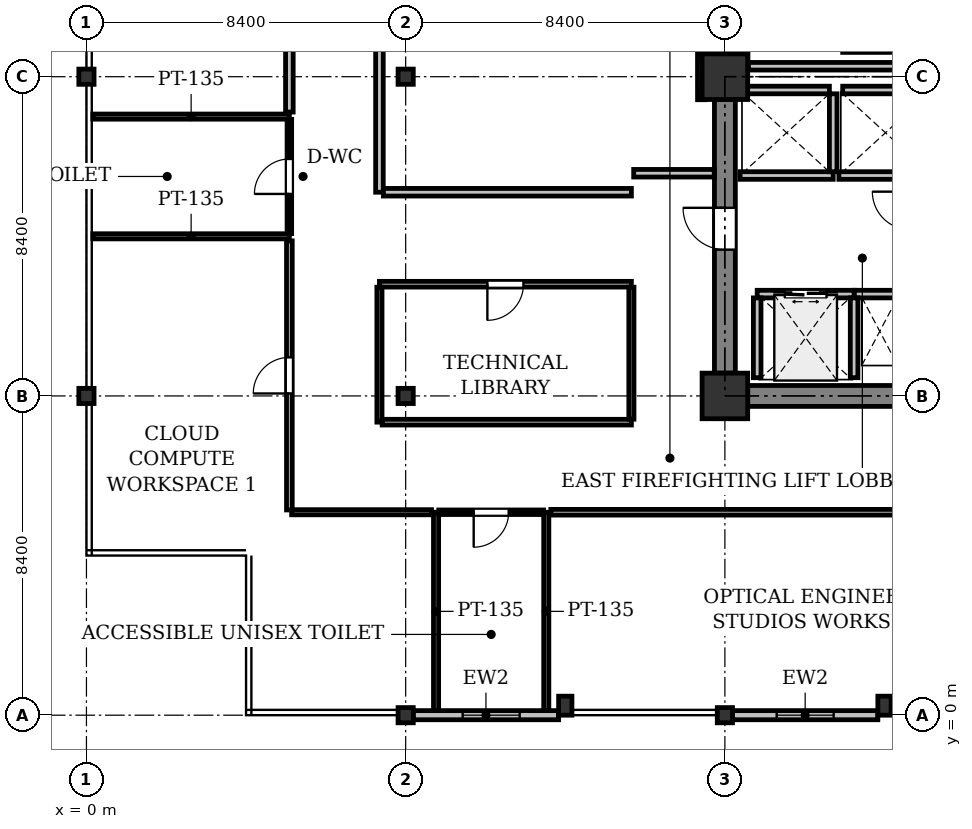
"""IFC4 building model, lengths in metres.
Left out: names, types, materials, properties, quantities, classifications, styles, units other than length and angle.
Written with IfcOpenShell. Run it as: python <this file> out.ifc"""

import sys

from ifc_helpers import new_model, si_unit, direction, frame, frame_2d, origin, origin_2d, place, context, subcontext, project, spatial, rectangle, i_section, extrude, element, fill, save


model = new_model("IFC4")
c1 = context("Model", 3, precision=1e-05, world=origin(), true_north=direction((0.0, 1.0)))
c2 = subcontext(c1, "Body", "Model", "MODEL_VIEW")
j1 = project(units=[si_unit("LENGTHUNIT", "METRE"), si_unit("PLANEANGLEUNIT", "RADIAN")], contexts=[c1])
p1 = place(None, origin())
s1 = spatial("IfcSite", under=j1, at=p1, CompositionType="ELEMENT")
p2 = place(p1, origin())
s2 = spatial("IfcBuilding", under=s1, at=p2, CompositionType="ELEMENT")
p3 = place(p2, frame((0.0, 0.0, 96.7)))
s3 = spatial("IfcBuildingStorey", under=s2, at=p3, CompositionType="ELEMENT", Elevation=96.7)
for number, where, z_axis, x_axis in (
    (1, (0.0, 8.4, 0.0), (0.0, 0.0, 1.0), (1.0, 0.0, 0.0)),
    (2, (0.0, 16.8, 0.0), (0.0, 0.0, 1.0), (1.0, 0.0, 0.0)),
    (3, (8.4, 0.0, 0.0), (0.0, 0.0, 1.0), (1.0, 0.0, 0.0)),
    (4, (8.4, 8.4, 0.0), (0.0, 0.0, 1.0), (1.0, 0.0, 0.0)),
    (5, (8.4, 16.8, 0.0), (0.0, 0.0, 1.0), (1.0, 0.0, 0.0)),
    (6, (16.8, 0.0, 0.0), (0.0, 0.0, 1.0), (1.0, 0.0, 0.0)),
):
    element("IfcColumn", number, at=place(p3, frame(where, z_axis=z_axis, x_axis=x_axis)), inside=s3, PredefinedType="COLUMN", context=c2, shape_type="SweptSolid", body=[
        extrude(i_section(OverallWidth=0.4, OverallDepth=0.4, WebThickness=0.025, FlangeThickness=0.04, at=origin_2d()), origin(), (0.0, 0.0, 1.0), 4.1),
    ])
for number, where, z_axis, x_axis in (
    (7, (16.8, 8.4, 0.0), (0.0, 0.0, 1.0), (1.0, 0.0, 0.0)),
    (8, (16.8, 16.8, 0.0), (0.0, 0.0, 1.0), (1.0, 0.0, 0.0)),
):
    element("IfcColumn", number, at=place(p3, frame(where, z_axis=z_axis, x_axis=x_axis)), inside=s3, PredefinedType="COLUMN", context=c2, shape_type="SweptSolid", body=[
        extrude(rectangle(XDim=1.2, YDim=1.2, at=origin_2d()), origin(), (0.0, 0.0, 1.0), 4.1),
    ])
for number, where, z_axis, x_axis in (
    (9, (12.6, 0.25, 0.0), (0.0, 0.0, 1.0), (1.0, 0.0, 0.0)),
    (10, (21.0, 0.25, 0.0), (0.0, 0.0, 1.0), (1.0, 0.0, 0.0)),
):
    element("IfcColumn", number, at=place(p3, frame(where, z_axis=z_axis, x_axis=x_axis)), inside=s3, PredefinedType="PILASTER", context=c2, shape_type="SweptSolid", body=[
        extrude(rectangle(XDim=0.35, YDim=0.5, at=origin_2d()), origin(), (0.0, 0.0, 1.0), 4.1),
    ])
p4 = place(p3, frame((20.825, 0.0, 0.0), z_axis=(0.0, 0.0, 1.0), x_axis=(-1.0, 0.0, 0.0)))
e11 = element("IfcWall", 11, at=p4, inside=s3, PredefinedType="STANDARD", context=c2, shape_type="SweptSolid", body=[
    extrude(rectangle(XDim=3.825, YDim=0.24, at=frame_2d((1.913, 0.0))), origin(), (0.0, 0.0, 1.0), 3.422),
])
p5 = place(p4, frame((1.163, 0.0, 0.9)))
e12 = element("IfcOpeningElement", 12, at=p5, cuts=e11, PredefinedType="OPENING", context=c2, shape_type="SweptSolid", body=[
    extrude(rectangle(XDim=1.5, YDim=1.6, at=frame_2d((0.75, 0.8))), frame((0.0, 0.13, 0.0), z_axis=(0.0, -1.0, 0.0), x_axis=(1.0, 0.0, 0.0)), (0.0, 0.0, 1.0), 0.26),
])
p6 = place(p3, frame((12.425, 0.0, 0.0), z_axis=(0.0, 0.0, 1.0), x_axis=(-1.0, 0.0, 0.0)))
e13 = element("IfcWall", 13, at=p6, inside=s3, PredefinedType="STANDARD", context=c2, shape_type="SweptSolid", body=[
    extrude(rectangle(XDim=3.825, YDim=0.24, at=frame_2d((1.913, 0.0))), origin(), (0.0, 0.0, 1.0), 3.422),
])
p7 = place(p6, frame((1.025, 0.0, 0.9)))
e14 = element("IfcOpeningElement", 14, at=p7, cuts=e13, PredefinedType="OPENING", context=c2, shape_type="SweptSolid", body=[
    extrude(rectangle(XDim=1.5, YDim=1.6, at=frame_2d((0.75, 0.8))), frame((0.0, 0.13, 0.0), z_axis=(0.0, -1.0, 0.0), x_axis=(1.0, 0.0, 0.0)), (0.0, 0.0, 1.0), 0.26),
])
p8 = place(p3, frame((17.4, 8.4, 0.0), z_axis=(0.0, 0.0, 1.0), x_axis=(1.0, 0.0, 0.0)))
e15 = element("IfcWall", 15, at=p8, inside=s3, PredefinedType="SHEAR", context=c2, shape_type="SweptSolid", body=[
    extrude(rectangle(XDim=7.2, YDim=0.55, at=frame_2d((3.6, 0.0))), origin(), (0.0, 0.0, 1.0), 3.825),
])
p9 = place(p3, frame((16.8, 9.0, 0.0), z_axis=(0.0, 0.0, 1.0), x_axis=(0.0, 1.0, 0.0)))
e16 = element("IfcWall", 16, at=p9, inside=s3, PredefinedType="SHEAR", context=c2, shape_type="SweptSolid", body=[
    extrude(rectangle(XDim=7.2, YDim=0.55, at=frame_2d((3.6, 0.0))), origin(), (0.0, 0.0, 1.0), 3.825),
])
p10 = place(p9, frame((3.25, 0.0, 0.0)))
e17 = element("IfcOpeningElement", 17, at=p10, cuts=e16, PredefinedType="OPENING", context=c2, shape_type="SweptSolid", body=[
    extrude(rectangle(XDim=1.1, YDim=2.15, at=frame_2d((0.55, 1.075))), frame((0.0, 0.285, 0.0), z_axis=(0.0, -1.0, 0.0), x_axis=(1.0, 0.0, 0.0)), (0.0, 0.0, 1.0), 0.57),
])
p11 = place(p3, frame((20.2, 11.08, 0.0), z_axis=(0.0, 0.0, 1.0), x_axis=(1.0, 0.0, 0.0)))
e18 = element("IfcWall", 18, at=p11, inside=s3, PredefinedType="PARTITIONING", context=c2, shape_type="SweptSolid", body=[
    extrude(rectangle(XDim=1.35, YDim=0.2, at=frame_2d((0.675, 0.0))), origin(), (0.0, 0.0, 1.0), 3.825),
])
p12 = place(p3, frame((17.65, 11.08, 0.0), z_axis=(0.0, 0.0, 1.0), x_axis=(1.0, 0.0, 0.0)))
e19 = element("IfcWall", 19, at=p12, inside=s3, PredefinedType="PARTITIONING", context=c2, shape_type="SweptSolid", body=[
    extrude(rectangle(XDim=2.55, YDim=0.2, at=frame_2d((1.275, 0.0))), origin(), (0.0, 0.0, 1.0), 3.825),
])
p13 = place(p12, frame((0.725, 0.0, 0.0)))
e20 = element("IfcOpeningElement", 20, at=p13, cuts=e19, PredefinedType="OPENING", context=c2, shape_type="SweptSolid", body=[
    extrude(rectangle(XDim=1.1, YDim=2.2, at=frame_2d((0.55, 1.1))), frame((0.0, 0.11, 0.0), z_axis=(0.0, -1.0, 0.0), x_axis=(1.0, 0.0, 0.0)), (0.0, 0.0, 1.0), 0.22),
])
for number, where, z_axis, x_axis in (
    (21, (20.2, 8.88, 0.0), (0.0, 0.0, 1.0), (0.0, 1.0, 0.0)),
    (22, (17.65, 8.88, 0.0), (0.0, 0.0, 1.0), (0.0, 1.0, 0.0)),
):
    element("IfcWall", number, at=place(p3, frame(where, z_axis=z_axis, x_axis=x_axis)), inside=s3, PredefinedType="PARTITIONING", context=c2, shape_type="SweptSolid", body=[
        extrude(rectangle(XDim=2.1, YDim=0.2, at=frame_2d((1.05, 0.0))), origin(), (0.0, 0.0, 1.0), 3.825),
    ])
p14 = place(p3, frame((17.2, 14.2, 0.0), z_axis=(0.0, 0.0, 1.0), x_axis=(1.0, 0.0, 0.0)))
e23 = element("IfcWall", 23, at=p14, inside=s3, PredefinedType="PARTITIONING", context=c2, shape_type="SweptSolid", body=[
    extrude(rectangle(XDim=2.45, YDim=0.2, at=frame_2d((1.225, 0.0))), origin(), (0.0, 0.0, 1.0), 3.825),
])
p15 = place(p3, frame((19.65, 14.3, 0.0), z_axis=(0.0, 0.0, 1.0), x_axis=(0.0, 1.0, 0.0)))
e24 = element("IfcWall", 24, at=p15, inside=s3, PredefinedType="PARTITIONING", context=c2, shape_type="SweptSolid", body=[
    extrude(rectangle(XDim=2.05, YDim=0.2, at=frame_2d((1.025, 0.0))), origin(), (0.0, 0.0, 1.0), 3.825),
])
p16 = place(p3, frame((17.3, 16.45, 0.0), z_axis=(0.0, 0.0, 1.0), x_axis=(1.0, 0.0, 0.0)))
e25 = element("IfcWall", 25, at=p16, inside=s3, PredefinedType="PARTITIONING", context=c2, shape_type="SweptSolid", body=[
    extrude(rectangle(XDim=2.25, YDim=0.2, at=frame_2d((1.125, 0.0))), origin(), (0.0, 0.0, 1.0), 3.825),
])
p17 = place(p3, frame((19.8, 14.2, 0.0), z_axis=(0.0, 0.0, 1.0), x_axis=(1.0, 0.0, 0.0)))
e26 = element("IfcWall", 26, at=p17, inside=s3, PredefinedType="PARTITIONING", context=c2, shape_type="SweptSolid", body=[
    extrude(rectangle(XDim=2.45, YDim=0.2, at=frame_2d((1.225, 0.0))), origin(), (0.0, 0.0, 1.0), 3.825),
])
p18 = place(p3, frame((19.9, 16.45, 0.0), z_axis=(0.0, 0.0, 1.0), x_axis=(1.0, 0.0, 0.0)))
e27 = element("IfcWall", 27, at=p18, inside=s3, PredefinedType="PARTITIONING", context=c2, shape_type="SweptSolid", body=[
    extrude(rectangle(XDim=2.25, YDim=0.2, at=frame_2d((1.125, 0.0))), origin(), (0.0, 0.0, 1.0), 3.825),
])
for number, where, z_axis, x_axis in (
    (28, (5.34, 15.75, 0.0), (0.0, 0.0, 1.0), (-1.0, 0.0, 0.0)),
    (29, (0.169, 12.6, 0.0), (0.0, 0.0, 1.0), (1.0, 0.0, 0.0)),
):
    element("IfcWall", number, at=place(p3, frame(where, z_axis=z_axis, x_axis=x_axis)), inside=s3, PredefinedType="PARTITIONING", context=c2, shape_type="SweptSolid", body=[
        extrude(rectangle(XDim=5.171, YDim=0.135, at=frame_2d((2.585, 0.0))), origin(), (0.0, 0.0, 1.0), 3.469),
    ])
p19 = place(p3, frame((5.34, 12.671, 0.0), z_axis=(0.0, 0.0, 1.0), x_axis=(0.0, 1.0, 0.0)))
e30 = element("IfcWall", 30, at=p19, inside=s3, PredefinedType="PARTITIONING", context=c2, shape_type="SweptSolid", body=[
    extrude(rectangle(XDim=3.007, YDim=0.12, at=frame_2d((1.503, 0.0))), origin(), (0.0, 0.0, 1.0), 3.825),
])
p20 = place(p19, frame((1.043, 0.0, 0.0)))
e31 = element("IfcOpeningElement", 31, at=p20, cuts=e30, PredefinedType="OPENING", context=c2, shape_type="SweptSolid", body=[
    extrude(rectangle(XDim=0.92, YDim=2.1, at=frame_2d((0.46, 1.05))), frame((0.0, 0.07, 0.0), z_axis=(0.0, -1.0, 0.0), x_axis=(1.0, 0.0, 0.0)), (0.0, 0.0, 1.0), 0.14),
])
for number, where, z_axis, x_axis in (
    (32, (9.2, 5.34, 0.0), (0.0, 0.0, 1.0), (0.0, -1.0, 0.0)),
    (33, (12.1, 0.124, 0.0), (0.0, 0.0, 1.0), (0.0, 1.0, 0.0)),
):
    element("IfcWall", number, at=place(p3, frame(where, z_axis=z_axis, x_axis=x_axis)), inside=s3, PredefinedType="PARTITIONING", context=c2, shape_type="SweptSolid", body=[
        extrude(rectangle(XDim=5.216, YDim=0.135, at=frame_2d((2.608, 0.0))), origin(), (0.0, 0.0, 1.0), 3.825),
    ])
p21 = place(p3, frame((12.029, 5.34, 0.0), z_axis=(0.0, 0.0, 1.0), x_axis=(-1.0, 0.0, 0.0)))
e34 = element("IfcWall", 34, at=p21, inside=s3, PredefinedType="PARTITIONING", context=c2, shape_type="SweptSolid", body=[
    extrude(rectangle(XDim=2.757, YDim=0.12, at=frame_2d((1.378, 0.0))), origin(), (0.0, 0.0, 1.0), 3.825),
])
p22 = place(p21, frame((0.918, 0.0, 0.0)))
e35 = element("IfcOpeningElement", 35, at=p22, cuts=e34, PredefinedType="OPENING", context=c2, shape_type="SweptSolid", body=[
    extrude(rectangle(XDim=0.92, YDim=2.1, at=frame_2d((0.46, 1.05))), frame((0.0, 0.07, 0.0), z_axis=(0.0, -1.0, 0.0), x_axis=(1.0, 0.0, 0.0)), (0.0, 0.0, 1.0), 0.14),
])
p23 = place(p3, frame((14.34, 11.34, 0.0), z_axis=(0.0, 0.0, 1.0), x_axis=(-1.0, 0.0, 0.0)))
e36 = element("IfcWall", 36, at=p23, inside=s3, PredefinedType="PARTITIONING", context=c2, shape_type="SweptSolid", body=[
    extrude(rectangle(XDim=6.63, YDim=0.15, at=frame_2d((3.315, 0.0))), origin(), (0.0, 0.0, 1.0), 3.297),
])
p24 = place(p23, frame((2.84, 0.0, 0.0)))
e37 = element("IfcOpeningElement", 37, at=p24, cuts=e36, PredefinedType="OPENING", context=c2, shape_type="SweptSolid", body=[
    extrude(rectangle(XDim=0.95, YDim=2.15, at=frame_2d((0.475, 1.075))), frame((0.0, 0.085, 0.0), z_axis=(0.0, -1.0, 0.0), x_axis=(1.0, 0.0, 0.0)), (0.0, 0.0, 1.0), 0.17),
])
p25 = place(p3, frame((7.71, 11.261, 0.0), z_axis=(0.0, 0.0, 1.0), x_axis=(0.0, -1.0, 0.0)))
e38 = element("IfcWall", 38, at=p25, inside=s3, PredefinedType="PARTITIONING", context=c2, shape_type="SweptSolid", body=[
    extrude(rectangle(XDim=3.551, YDim=0.135, at=frame_2d((1.775, 0.0))), origin(), (0.0, 0.0, 1.0), 3.292),
])
p26 = place(p3, frame((7.781, 7.71, 0.0), z_axis=(0.0, 0.0, 1.0), x_axis=(1.0, 0.0, 0.0)))
e39 = element("IfcWall", 39, at=p26, inside=s3, PredefinedType="PARTITIONING", context=c2, shape_type="SweptSolid", body=[
    extrude(rectangle(XDim=6.559, YDim=0.15, at=frame_2d((3.279, 0.0))), origin(), (0.0, 0.0, 1.0), 3.297),
])
p27 = place(p3, frame((14.34, 7.789, 0.0), z_axis=(0.0, 0.0, 1.0), x_axis=(0.0, 1.0, 0.0)))
e40 = element("IfcWall", 40, at=p27, inside=s3, PredefinedType="PARTITIONING", context=c2, shape_type="SweptSolid", body=[
    extrude(rectangle(XDim=3.472, YDim=0.135, at=frame_2d((1.736, 0.0))), origin(), (0.0, 0.0, 1.0), 3.292),
])
p28 = place(p3, frame((9.08, 5.34, 0.0), z_axis=(0.0, 0.0, 1.0), x_axis=(-1.0, 0.0, 0.0)))
e41 = element("IfcWall", 41, at=p28, inside=s3, PredefinedType="PARTITIONING", context=c2, shape_type="SweptSolid", body=[
    extrude(rectangle(XDim=3.68, YDim=0.135, at=frame_2d((1.84, 0.0))), origin(), (0.0, 0.0, 1.0), 3.297),
])
p29 = place(p3, frame((5.34, 5.4, 0.0), z_axis=(0.0, 0.0, 1.0), x_axis=(0.0, 1.0, 0.0)))
e42 = element("IfcWall", 42, at=p29, inside=s3, PredefinedType="PARTITIONING", context=c2, shape_type="SweptSolid", body=[
    extrude(rectangle(XDim=7.08, YDim=0.15, at=frame_2d((3.54, 0.0))), origin(), (0.0, 0.0, 1.0), 3.292),
])
p30 = place(p29, frame((3.065, 0.0, 0.0)))
e43 = element("IfcOpeningElement", 43, at=p30, cuts=e42, PredefinedType="OPENING", context=c2, shape_type="SweptSolid", body=[
    extrude(rectangle(XDim=0.95, YDim=2.15, at=frame_2d((0.475, 1.075))), frame((0.0, 0.085, 0.0), z_axis=(0.0, -1.0, 0.0), x_axis=(1.0, 0.0, 0.0)), (0.0, 0.0, 1.0), 0.17),
])
p31 = place(p3, frame((5.34, 15.87, 0.0), z_axis=(0.0, 0.0, 1.0), x_axis=(0.0, 1.0, 0.0)))
e44 = element("IfcWall", 44, at=p31, inside=s3, PredefinedType="PARTITIONING", context=c2, shape_type="SweptSolid", body=[
    extrude(rectangle(XDim=18.56, YDim=0.2, at=frame_2d((9.28, 0.0))), origin(), (0.0, 0.0, 1.0), 3.292),
])
p32 = place(p31, frame((8.78, 0.0, 0.0)))
e45 = element("IfcOpeningElement", 45, at=p32, cuts=e44, PredefinedType="OPENING", context=c2, shape_type="SweptSolid", body=[
    extrude(rectangle(XDim=1.0, YDim=2.15, at=frame_2d((0.5, 1.075))), frame((0.0, 0.11, 0.0), z_axis=(0.0, -1.0, 0.0), x_axis=(1.0, 0.0, 0.0)), (0.0, 0.0, 1.0), 0.22),
])
p33 = place(p3, frame((33.587, 5.34, 0.0), z_axis=(0.0, 0.0, 1.0), x_axis=(-1.0, 0.0, 0.0)))
e46 = element("IfcWall", 46, at=p33, inside=s3, PredefinedType="PARTITIONING", context=c2, shape_type="SweptSolid", body=[
    extrude(rectangle(XDim=21.367, YDim=0.15, at=frame_2d((10.683, 0.0))), origin(), (0.0, 0.0, 1.0), 3.297),
])
p34 = place(p33, frame((10.208, 0.0, 0.0)))
e47 = element("IfcOpeningElement", 47, at=p34, cuts=e46, PredefinedType="OPENING", context=c2, shape_type="SweptSolid", body=[
    extrude(rectangle(XDim=0.95, YDim=2.15, at=frame_2d((0.475, 1.075))), frame((0.0, 0.085, 0.0), z_axis=(0.0, -1.0, 0.0), x_axis=(1.0, 0.0, 0.0)), (0.0, 0.0, 1.0), 0.17),
])
p35 = place(p3, frame((34.236, 17.54, 0.0), z_axis=(0.0, 0.0, 1.0), x_axis=(-1.0, 0.0, 0.0)))
e48 = element("IfcWall", 48, at=p35, inside=s3, PredefinedType="PARTITIONING", context=c2, shape_type="SweptSolid", body=[
    extrude(rectangle(XDim=14.336, YDim=0.2, at=frame_2d((7.168, 0.0))), origin(), (0.0, 0.0, 1.0), 3.297),
])
p36 = place(p3, frame((7.71, 22.686, 0.0), z_axis=(0.0, 0.0, 1.0), x_axis=(0.0, -1.0, 0.0)))
e49 = element("IfcWall", 49, at=p36, inside=s3, PredefinedType="PARTITIONING", context=c2, shape_type="SweptSolid", body=[
    extrude(rectangle(XDim=8.926, YDim=0.2, at=frame_2d((4.463, 0.0))), origin(), (0.0, 0.0, 1.0), 3.292),
])
p37 = place(p3, frame((7.814, 13.76, 0.0), z_axis=(0.0, 0.0, 1.0), x_axis=(1.0, 0.0, 0.0)))
e50 = element("IfcWall", 50, at=p37, inside=s3, PredefinedType="PARTITIONING", context=c2, shape_type="SweptSolid", body=[
    extrude(rectangle(XDim=6.526, YDim=0.2, at=frame_2d((3.263, 0.0))), origin(), (0.0, 0.0, 1.0), 3.297),
])
p38 = place(p3, frame((14.4, 14.26, 0.0), z_axis=(0.0, 0.0, 1.0), x_axis=(1.0, 0.0, 0.0)))
e51 = element("IfcWall", 51, at=p38, inside=s3, PredefinedType="PARTITIONING", context=c2, shape_type="SweptSolid", body=[
    extrude(rectangle(XDim=2.121, YDim=0.2, at=frame_2d((1.061, 0.0))), origin(), (0.0, 0.0, 1.0), 3.825),
])
p39 = place(p3, frame((16.181, 16.194, 0.0), z_axis=(0.0, 0.0, 1.0), x_axis=(-0.000809880277, 0.999999672047, 0.0)))
e52 = element("IfcWall", 52, at=p39, inside=s3, PredefinedType="PARTITIONING", context=c2, shape_type="SweptSolid", body=[
    extrude(rectangle(XDim=1.206, YDim=0.2, at=frame_2d((0.603, 0.0))), origin(), (0.0, 0.0, 1.0), 3.292),
])
p40 = place(p3, frame((16.196, 17.42, 0.0), z_axis=(0.0, 0.0, 1.0), x_axis=(0.99999991854, -0.000403632661, 0.0)))
e53 = element("IfcWall", 53, at=p40, inside=s3, PredefinedType="PARTITIONING", context=c2, shape_type="SweptSolid", body=[
    extrude(rectangle(XDim=1.21, YDim=0.2, at=frame_2d((0.605, 0.0))), origin(), (0.0, 0.0, 1.0), 3.297),
])
p41 = place(p3, frame((17.42, 17.075, 0.0), z_axis=(0.0, 0.0, 1.0), x_axis=(1.0, 0.0, 0.0)))
e54 = element("IfcWall", 54, at=p41, inside=s3, PredefinedType="PARTITIONING", context=c2, shape_type="SweptSolid", body=[
    extrude(rectangle(XDim=7.16, YDim=0.2, at=frame_2d((3.58, 0.0))), origin(), (0.0, 0.0, 1.0), 3.469),
])
p42 = place(p5, origin())
e55 = element("IfcWindow", 55, at=p42, inside=s3, PartitioningType="SINGLE_PANEL", PredefinedType="WINDOW", context=c2, shape_type="SweptSolid", body=[
    extrude(rectangle(XDim=1.5, YDim=1.6, at=frame_2d((0.75, 0.8))), frame((0.0, 0.03, 0.0), z_axis=(0.0, -1.0, 0.0), x_axis=(1.0, 0.0, 0.0)), (0.0, 0.0, 1.0), 0.06),
])
fill(e12, e55)
p43 = place(p7, origin())
e56 = element("IfcWindow", 56, at=p43, inside=s3, PartitioningType="SINGLE_PANEL", PredefinedType="WINDOW", context=c2, shape_type="SweptSolid", body=[
    extrude(rectangle(XDim=1.5, YDim=1.6, at=frame_2d((0.75, 0.8))), frame((0.0, 0.03, 0.0), z_axis=(0.0, -1.0, 0.0), x_axis=(1.0, 0.0, 0.0)), (0.0, 0.0, 1.0), 0.06),
])
fill(e14, e56)
p44 = place(p10, origin())
e57 = element("IfcDoor", 57, at=p44, inside=s3, OperationType="SINGLE_SWING_RIGHT", PredefinedType="DOOR", context=c2, shape_type="SweptSolid", body=[
    extrude(rectangle(XDim=1.1, YDim=2.15, at=frame_2d((0.55, 1.075))), frame((0.0, 0.025, 0.0), z_axis=(0.0, -1.0, 0.0), x_axis=(1.0, 0.0, 0.0)), (0.0, 0.0, 1.0), 0.05),
])
fill(e17, e57)
p45 = place(p13, origin())
e58 = element("IfcDoor", 58, at=p45, inside=s3, OperationType="DOUBLE_DOOR_SLIDING", PredefinedType="DOOR", context=c2, shape_type="SweptSolid", body=[
    extrude(rectangle(XDim=1.1, YDim=2.2, at=frame_2d((0.55, 1.1))), frame((0.0, 0.025, 0.0), z_axis=(0.0, -1.0, 0.0), x_axis=(1.0, 0.0, 0.0)), (0.0, 0.0, 1.0), 0.05),
])
fill(e20, e58)
p46 = place(p20, origin())
e59 = element("IfcDoor", 59, at=p46, inside=s3, OperationType="SINGLE_SWING_LEFT", PredefinedType="DOOR", context=c2, shape_type="SweptSolid", body=[
    extrude(rectangle(XDim=0.92, YDim=2.1, at=frame_2d((0.46, 1.05))), frame((0.0, 0.025, 0.0), z_axis=(0.0, -1.0, 0.0), x_axis=(1.0, 0.0, 0.0)), (0.0, 0.0, 1.0), 0.05),
])
fill(e31, e59)
p47 = place(p22, origin())
e60 = element("IfcDoor", 60, at=p47, inside=s3, OperationType="SINGLE_SWING_RIGHT", PredefinedType="DOOR", context=c2, shape_type="SweptSolid", body=[
    extrude(rectangle(XDim=0.92, YDim=2.1, at=frame_2d((0.46, 1.05))), frame((0.0, 0.025, 0.0), z_axis=(0.0, -1.0, 0.0), x_axis=(1.0, 0.0, 0.0)), (0.0, 0.0, 1.0), 0.05),
])
fill(e35, e60)
p48 = place(p24, origin())
e61 = element("IfcDoor", 61, at=p48, inside=s3, OperationType="SINGLE_SWING_RIGHT", PredefinedType="DOOR", context=c2, shape_type="SweptSolid", body=[
    extrude(rectangle(XDim=0.95, YDim=2.15, at=frame_2d((0.475, 1.075))), frame((0.0, 0.025, 0.0), z_axis=(0.0, -1.0, 0.0), x_axis=(1.0, 0.0, 0.0)), (0.0, 0.0, 1.0), 0.05),
])
fill(e37, e61)
p49 = place(p30, origin())
e62 = element("IfcDoor", 62, at=p49, inside=s3, OperationType="SINGLE_SWING_LEFT", PredefinedType="DOOR", context=c2, shape_type="SweptSolid", body=[
    extrude(rectangle(XDim=0.95, YDim=2.15, at=frame_2d((0.475, 1.075))), frame((0.0, 0.025, 0.0), z_axis=(0.0, -1.0, 0.0), x_axis=(1.0, 0.0, 0.0)), (0.0, 0.0, 1.0), 0.05),
])
fill(e43, e62)
save(model, sys.argv[1])
